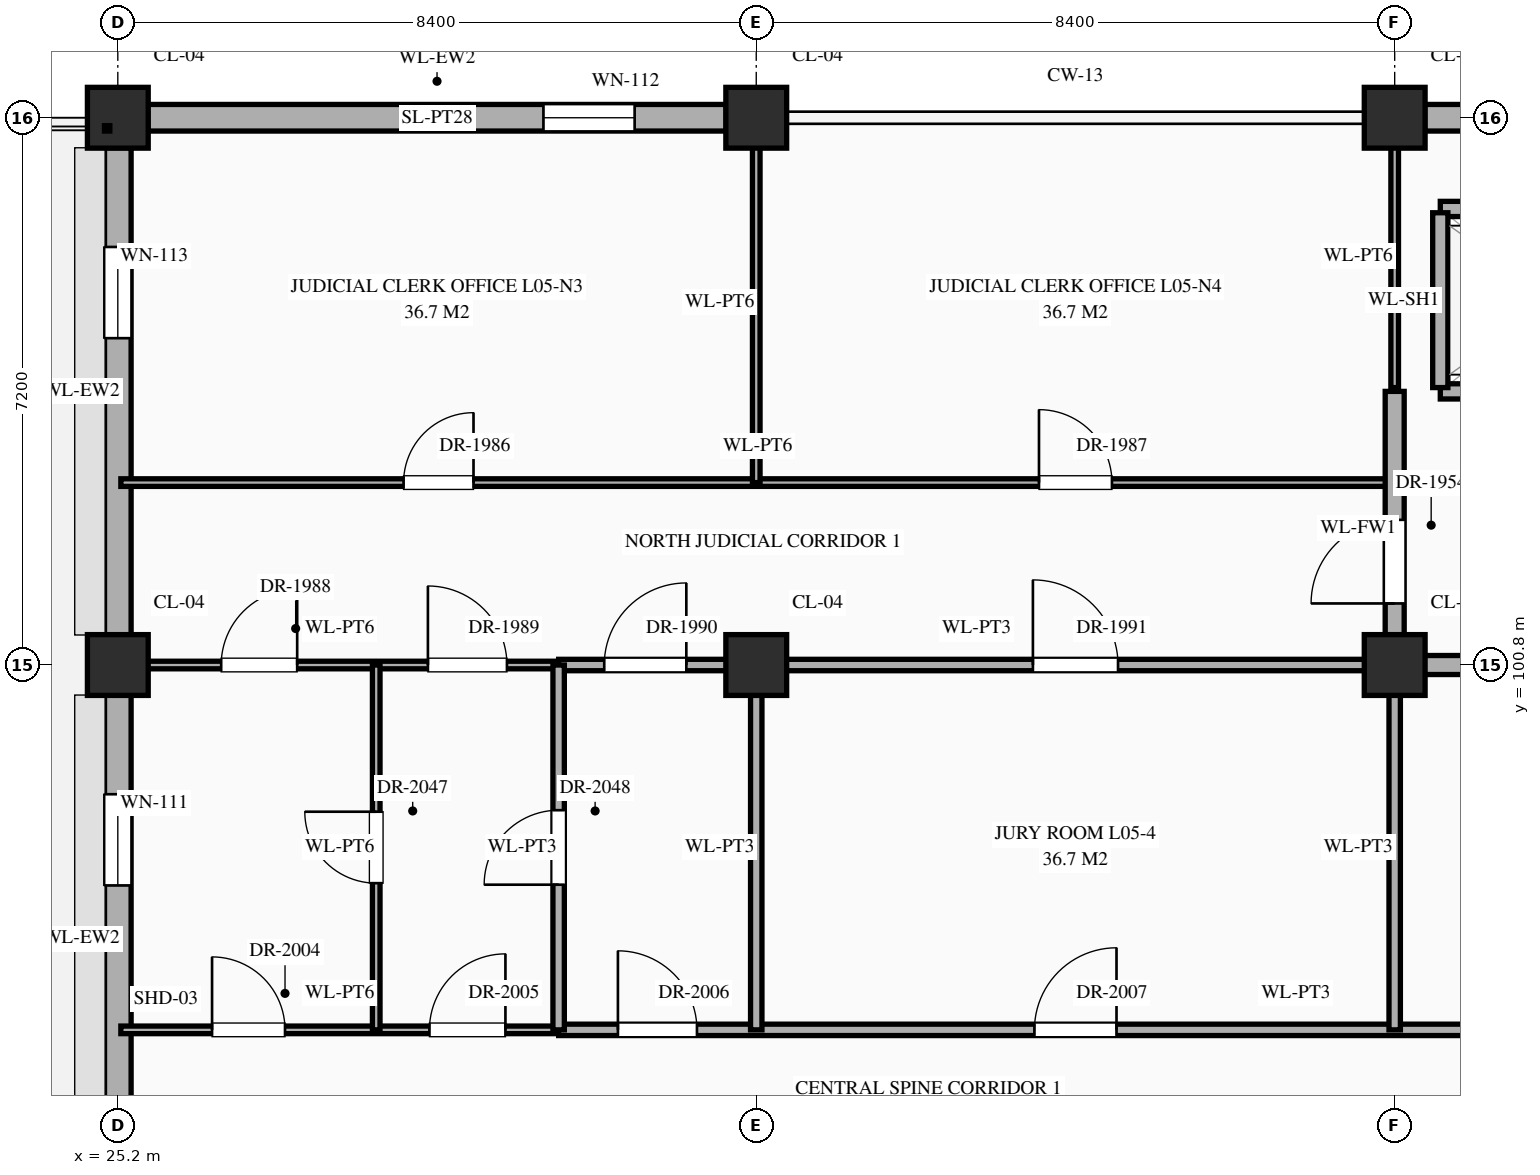
"""IFC4 building model, lengths in metres.
Left out: names, types, materials, properties, quantities, classifications, styles, units other than length and angle.
Written with IfcOpenShell. Run it as: python <this file> out.ifc"""

import sys

from ifc_helpers import new_model, si_unit, direction, frame, frame_2d, origin, origin_2d, place, context, subcontext, project, spatial, rectangle, extrude, element, fill, save


model = new_model("IFC4")
c1 = context("Model", 3, precision=1e-05, world=origin(), true_north=direction((0.0, 1.0)))
c2 = subcontext(c1, "Body", "Model", "MODEL_VIEW")
j1 = project(units=[si_unit("LENGTHUNIT", "METRE"), si_unit("PLANEANGLEUNIT", "RADIAN")], contexts=[c1])
p1 = place(None, origin())
s1 = spatial("IfcSite", under=j1, at=p1, CompositionType="ELEMENT")
p2 = place(p1, origin())
s2 = spatial("IfcBuilding", under=s1, at=p2, CompositionType="ELEMENT")
p3 = place(p2, frame((0.0, 0.0, 21.6)))
s3 = spatial("IfcBuildingStorey", under=s2, at=p3, CompositionType="ELEMENT", Elevation=21.6)
for number, where, z_axis, x_axis in (
    (1, (25.2, 100.8, 0.0), (0.0, 0.0, 1.0), (1.0, 0.0, 0.0)),
    (2, (25.2, 108.0, 0.0), (0.0, 0.0, 1.0), (1.0, 0.0, 0.0)),
    (3, (33.6, 100.8, 0.0), (0.0, 0.0, 1.0), (1.0, 0.0, 0.0)),
    (4, (33.6, 108.0, 0.0), (0.0, 0.0, 1.0), (1.0, 0.0, 0.0)),
    (5, (42.0, 100.8, 0.0), (0.0, 0.0, 1.0), (1.0, 0.0, 0.0)),
    (6, (42.0, 108.0, 0.0), (0.0, 0.0, 1.0), (1.0, 0.0, 0.0)),
):
    element("IfcColumn", number, at=place(p3, frame(where, z_axis=z_axis, x_axis=x_axis)), inside=s3, PredefinedType="COLUMN", context=c2, shape_type="SweptSolid", body=[
        extrude(rectangle(XDim=0.8, YDim=0.8, at=origin_2d()), origin(), (0.0, 0.0, 1.0), 4.5),
    ])
p4 = place(p3, frame((25.2, 93.995, 0.0), z_axis=(0.0, 0.0, 1.0), x_axis=(0.0, 1.0, 0.0)))
e7 = element("IfcWall", 7, at=p4, inside=s3, PredefinedType="STANDARD", context=c2, shape_type="SweptSolid", body=[
    extrude(rectangle(XDim=6.41, YDim=0.35, at=frame_2d((3.205, 0.0))), origin(), (0.0, 0.0, 1.0), 3.59),
])
p5 = place(p4, frame((3.905, 0.0, 0.85)))
e8 = element("IfcOpeningElement", 8, at=p5, cuts=e7, PredefinedType="OPENING", context=c2, shape_type="SweptSolid", body=[
    extrude(rectangle(XDim=1.2, YDim=1.74, at=frame_2d((0.6, 0.87))), frame((0.0, 0.187, 0.0), z_axis=(0.0, -1.0, 0.0), x_axis=(1.0, 0.0, 0.0)), (0.0, 0.0, 1.0), 0.374),
])
p6 = place(p3, frame((25.595, 108.0, 0.0), z_axis=(0.0, 0.0, 1.0), x_axis=(1.0, 0.0, 0.0)))
e9 = element("IfcWall", 9, at=p6, inside=s3, PredefinedType="STANDARD", context=c2, shape_type="SweptSolid", body=[
    extrude(rectangle(XDim=7.61, YDim=0.35, at=frame_2d((3.805, 0.0))), origin(), (0.0, 0.0, 1.0), 3.59),
])
p7 = place(p6, frame((5.205, 0.0, 0.85)))
e10 = element("IfcOpeningElement", 10, at=p7, cuts=e9, PredefinedType="OPENING", context=c2, shape_type="SweptSolid", body=[
    extrude(rectangle(XDim=1.2, YDim=1.92, at=frame_2d((0.6, 0.96))), frame((0.0, 0.187, 0.0), z_axis=(0.0, -1.0, 0.0), x_axis=(1.0, 0.0, 0.0)), (0.0, 0.0, 1.0), 0.374),
])
p8 = place(p3, frame((25.2, 101.195, 0.0), z_axis=(0.0, 0.0, 1.0), x_axis=(0.0, 1.0, 0.0)))
e11 = element("IfcWall", 11, at=p8, inside=s3, PredefinedType="STANDARD", context=c2, shape_type="SweptSolid", body=[
    extrude(rectangle(XDim=6.41, YDim=0.35, at=frame_2d((3.205, 0.0))), origin(), (0.0, 0.0, 1.0), 3.59),
])
p9 = place(p8, frame((3.905, 0.0, 0.85)))
e12 = element("IfcOpeningElement", 12, at=p9, cuts=e11, PredefinedType="OPENING", context=c2, shape_type="SweptSolid", body=[
    extrude(rectangle(XDim=1.2, YDim=1.92, at=frame_2d((0.6, 0.96))), frame((0.0, 0.187, 0.0), z_axis=(0.0, -1.0, 0.0), x_axis=(1.0, 0.0, 0.0)), (0.0, 0.0, 1.0), 0.374),
])
p10 = place(p3, frame((42.395, 108.0, 0.0), z_axis=(0.0, 0.0, 1.0), x_axis=(1.0, 0.0, 0.0)))
e13 = element("IfcWall", 13, at=p10, inside=s3, PredefinedType="STANDARD", context=c2, shape_type="SweptSolid", body=[
    extrude(rectangle(XDim=7.61, YDim=0.35, at=frame_2d((3.805, 0.0))), origin(), (0.0, 0.0, 1.0), 3.59),
])
p11 = place(p3, frame((25.24, 96.0, 0.0), z_axis=(0.0, 0.0, 1.0), x_axis=(1.0, 0.0, 0.0)))
e14 = element("IfcWall", 14, at=p11, inside=s3, PredefinedType="STANDARD", context=c2, shape_type="SweptSolid", body=[
    extrude(rectangle(XDim=5.76, YDim=0.1, at=frame_2d((2.88, 0.0))), origin(), (0.0, 0.0, 1.0), 4.24),
])
p12 = place(p11, frame((1.2, 0.0, 0.0)))
e15 = element("IfcOpeningElement", 15, at=p12, cuts=e14, PredefinedType="OPENING", context=c2, shape_type="SweptSolid", body=[
    extrude(rectangle(XDim=0.96, YDim=2.2, at=frame_2d((0.48, 1.1))), frame((0.0, 0.062, 0.0), z_axis=(0.0, -1.0, 0.0), x_axis=(1.0, 0.0, 0.0)), (0.0, 0.0, 1.0), 0.124),
])
p13 = place(p11, frame((4.06, 0.0, 0.0)))
e16 = element("IfcOpeningElement", 16, at=p13, cuts=e14, PredefinedType="OPENING", context=c2, shape_type="SweptSolid", body=[
    extrude(rectangle(XDim=1.0, YDim=2.25, at=frame_2d((0.5, 1.125))), frame((0.0, 0.062, 0.0), z_axis=(0.0, -1.0, 0.0), x_axis=(1.0, 0.0, 0.0)), (0.0, 0.0, 1.0), 0.124),
])
p14 = place(p3, frame((31.0, 96.0, 0.0), z_axis=(0.0, 0.0, 1.0), x_axis=(1.0, 0.0, 0.0)))
e17 = element("IfcWall", 17, at=p14, inside=s3, PredefinedType="STANDARD", context=c2, shape_type="SweptSolid", body=[
    extrude(rectangle(XDim=19.4, YDim=0.15, at=frame_2d((9.7, 0.0))), origin(), (0.0, 0.0, 1.0), 4.24),
])
p15 = place(p14, frame((0.78, 0.0, 0.0)))
e18 = element("IfcOpeningElement", 18, at=p15, cuts=e17, PredefinedType="OPENING", context=c2, shape_type="SweptSolid", body=[
    extrude(rectangle(XDim=1.04, YDim=2.2, at=frame_2d((0.52, 1.1))), frame((0.0, 0.087, 0.0), z_axis=(0.0, -1.0, 0.0), x_axis=(1.0, 0.0, 0.0)), (0.0, 0.0, 1.0), 0.174),
])
p16 = place(p14, frame((6.26, 0.0, 0.0)))
e19 = element("IfcOpeningElement", 19, at=p16, cuts=e17, PredefinedType="OPENING", context=c2, shape_type="SweptSolid", body=[
    extrude(rectangle(XDim=1.08, YDim=2.25, at=frame_2d((0.54, 1.125))), frame((0.0, 0.087, 0.0), z_axis=(0.0, -1.0, 0.0), x_axis=(1.0, 0.0, 0.0)), (0.0, 0.0, 1.0), 0.174),
])
p17 = place(p14, frame((14.64, 0.0, 0.0)))
e20 = element("IfcOpeningElement", 20, at=p17, cuts=e17, PredefinedType="OPENING", context=c2, shape_type="SweptSolid", body=[
    extrude(rectangle(XDim=1.12, YDim=2.25, at=frame_2d((0.56, 1.125))), frame((0.0, 0.087, 0.0), z_axis=(0.0, -1.0, 0.0), x_axis=(1.0, 0.0, 0.0)), (0.0, 0.0, 1.0), 0.174),
])
p18 = place(p3, frame((25.24, 100.8, 0.0), z_axis=(0.0, 0.0, 1.0), x_axis=(1.0, 0.0, 0.0)))
e21 = element("IfcWall", 21, at=p18, inside=s3, PredefinedType="STANDARD", context=c2, shape_type="SweptSolid", body=[
    extrude(rectangle(XDim=5.76, YDim=0.1, at=frame_2d((2.88, 0.0))), origin(), (0.0, 0.0, 1.0), 3.39),
])
p19 = place(p18, frame((1.32, 0.0, 0.0)))
e22 = element("IfcOpeningElement", 22, at=p19, cuts=e21, PredefinedType="OPENING", context=c2, shape_type="SweptSolid", body=[
    extrude(rectangle(XDim=1.0, YDim=2.25, at=frame_2d((0.5, 1.125))), frame((0.0, 0.062, 0.0), z_axis=(0.0, -1.0, 0.0), x_axis=(1.0, 0.0, 0.0)), (0.0, 0.0, 1.0), 0.124),
])
p20 = place(p18, frame((4.04, 0.0, 0.0)))
e23 = element("IfcOpeningElement", 23, at=p20, cuts=e21, PredefinedType="OPENING", context=c2, shape_type="SweptSolid", body=[
    extrude(rectangle(XDim=1.04, YDim=2.2, at=frame_2d((0.52, 1.1))), frame((0.0, 0.062, 0.0), z_axis=(0.0, -1.0, 0.0), x_axis=(1.0, 0.0, 0.0)), (0.0, 0.0, 1.0), 0.124),
])
p21 = place(p3, frame((31.0, 100.8, 0.0), z_axis=(0.0, 0.0, 1.0), x_axis=(1.0, 0.0, 0.0)))
e24 = element("IfcWall", 24, at=p21, inside=s3, PredefinedType="STANDARD", context=c2, shape_type="SweptSolid", body=[
    extrude(rectangle(XDim=11.0, YDim=0.15, at=frame_2d((5.5, 0.0))), origin(), (0.0, 0.0, 1.0), 3.39),
])
p22 = place(p21, frame((0.6, 0.0, 0.0)))
e25 = element("IfcOpeningElement", 25, at=p22, cuts=e24, PredefinedType="OPENING", context=c2, shape_type="SweptSolid", body=[
    extrude(rectangle(XDim=1.08, YDim=2.25, at=frame_2d((0.54, 1.125))), frame((0.0, 0.087, 0.0), z_axis=(0.0, -1.0, 0.0), x_axis=(1.0, 0.0, 0.0)), (0.0, 0.0, 1.0), 0.174),
])
p23 = place(p21, frame((6.24, 0.0, 0.0)))
e26 = element("IfcOpeningElement", 26, at=p23, cuts=e24, PredefinedType="OPENING", context=c2, shape_type="SweptSolid", body=[
    extrude(rectangle(XDim=1.12, YDim=2.25, at=frame_2d((0.56, 1.125))), frame((0.0, 0.087, 0.0), z_axis=(0.0, -1.0, 0.0), x_axis=(1.0, 0.0, 0.0)), (0.0, 0.0, 1.0), 0.174),
])
p24 = place(p3, frame((42.0, 100.8, 0.0), z_axis=(0.0, 0.0, 1.0), x_axis=(1.0, 0.0, 0.0)))
e27 = element("IfcWall", 27, at=p24, inside=s3, PredefinedType="STANDARD", context=c2, shape_type="SweptSolid", body=[
    extrude(rectangle(XDim=4.2, YDim=0.25, at=frame_2d((2.1, 0.0))), origin(), (0.0, 0.0, 1.0), 3.39),
])
p25 = place(p3, frame((25.24, 103.2, 0.0), z_axis=(0.0, 0.0, 1.0), x_axis=(1.0, 0.0, 0.0)))
e28 = element("IfcWall", 28, at=p25, inside=s3, PredefinedType="STANDARD", context=c2, shape_type="SweptSolid", body=[
    extrude(rectangle(XDim=16.76, YDim=0.1, at=frame_2d((8.38, 0.0))), origin(), (0.0, 0.0, 1.0), 4.24),
])
p26 = place(p25, frame((3.72, 0.0, 0.0)))
e29 = element("IfcOpeningElement", 29, at=p26, cuts=e28, PredefinedType="OPENING", context=c2, shape_type="SweptSolid", body=[
    extrude(rectangle(XDim=0.92, YDim=2.15, at=frame_2d((0.46, 1.075))), frame((0.0, 0.062, 0.0), z_axis=(0.0, -1.0, 0.0), x_axis=(1.0, 0.0, 0.0)), (0.0, 0.0, 1.0), 0.124),
])
p27 = place(p25, frame((12.08, 0.0, 0.0)))
e30 = element("IfcOpeningElement", 30, at=p27, cuts=e28, PredefinedType="OPENING", context=c2, shape_type="SweptSolid", body=[
    extrude(rectangle(XDim=0.96, YDim=2.2, at=frame_2d((0.48, 1.1))), frame((0.0, 0.062, 0.0), z_axis=(0.0, -1.0, 0.0), x_axis=(1.0, 0.0, 0.0)), (0.0, 0.0, 1.0), 0.124),
])
p28 = place(p3, frame((42.6, 104.4, 0.0), z_axis=(0.0, 0.0, 1.0), x_axis=(1.0, 0.0, 0.0)))
e31 = element("IfcWall", 31, at=p28, inside=s3, PredefinedType="STANDARD", context=c2, shape_type="SweptSolid", body=[
    extrude(rectangle(XDim=3.0, YDim=0.2, at=frame_2d((1.5, 0.0))), origin(), (0.0, 0.0, 1.0), 4.24),
])
p29 = place(p28, frame((0.9, 0.0, 0.0)))
e32 = element("IfcOpeningElement", 32, at=p29, cuts=e31, PredefinedType="OPENING", context=c2, shape_type="SweptSolid", body=[
    extrude(rectangle(XDim=1.2, YDim=2.15, at=frame_2d((0.6, 1.075))), frame((0.0, 0.112, 0.0), z_axis=(0.0, -1.0, 0.0), x_axis=(1.0, 0.0, 0.0)), (0.0, 0.0, 1.0), 0.224),
])
p30 = place(p3, frame((42.6, 106.8, 0.0), z_axis=(0.0, 0.0, 1.0), x_axis=(1.0, 0.0, 0.0)))
e33 = element("IfcWall", 33, at=p30, inside=s3, PredefinedType="STANDARD", context=c2, shape_type="SweptSolid", body=[
    extrude(rectangle(XDim=3.0, YDim=0.2, at=frame_2d((1.5, 0.0))), origin(), (0.0, 0.0, 1.0), 4.24),
])
p31 = place(p3, frame((28.6, 96.0, 0.0), z_axis=(0.0, 0.0, 1.0), x_axis=(0.0, 1.0, 0.0)))
e34 = element("IfcWall", 34, at=p31, inside=s3, PredefinedType="STANDARD", context=c2, shape_type="SweptSolid", body=[
    extrude(rectangle(XDim=4.8, YDim=0.1, at=frame_2d((2.4, 0.0))), origin(), (0.0, 0.0, 1.0), 4.24),
])
p32 = place(p31, frame((1.93, 0.0, 0.0)))
e35 = element("IfcOpeningElement", 35, at=p32, cuts=e34, PredefinedType="OPENING", context=c2, shape_type="SweptSolid", body=[
    extrude(rectangle(XDim=0.94, YDim=2.3, at=frame_2d((0.47, 1.15))), frame((0.0, 0.062, 0.0), z_axis=(0.0, -1.0, 0.0), x_axis=(1.0, 0.0, 0.0)), (0.0, 0.0, 1.0), 0.124),
])
p33 = place(p3, frame((31.0, 96.0, 0.0), z_axis=(0.0, 0.0, 1.0), x_axis=(0.0, 1.0, 0.0)))
e36 = element("IfcWall", 36, at=p33, inside=s3, PredefinedType="STANDARD", context=c2, shape_type="SweptSolid", body=[
    extrude(rectangle(XDim=4.8, YDim=0.15, at=frame_2d((2.4, 0.0))), origin(), (0.0, 0.0, 1.0), 4.24),
])
p34 = place(p33, frame((1.91, 0.0, 0.0)))
e37 = element("IfcOpeningElement", 37, at=p34, cuts=e36, PredefinedType="OPENING", context=c2, shape_type="SweptSolid", body=[
    extrude(rectangle(XDim=0.98, YDim=2.35, at=frame_2d((0.49, 1.175))), frame((0.0, 0.087, 0.0), z_axis=(0.0, -1.0, 0.0), x_axis=(1.0, 0.0, 0.0)), (0.0, 0.0, 1.0), 0.174),
])
p35 = place(p3, frame((33.6, 96.0, 0.0), z_axis=(0.0, 0.0, 1.0), x_axis=(0.0, 1.0, 0.0)))
e38 = element("IfcWall", 38, at=p35, inside=s3, PredefinedType="STANDARD", context=c2, shape_type="SweptSolid", body=[
    extrude(rectangle(XDim=4.8, YDim=0.15, at=frame_2d((2.4, 0.0))), origin(), (0.0, 0.0, 1.0), 4.24),
])
p36 = place(p3, frame((33.6, 103.2, 0.0), z_axis=(0.0, 0.0, 1.0), x_axis=(0.0, 1.0, 0.0)))
e39 = element("IfcWall", 39, at=p36, inside=s3, PredefinedType="STANDARD", context=c2, shape_type="SweptSolid", body=[
    extrude(rectangle(XDim=4.76, YDim=0.1, at=frame_2d((2.38, 0.0))), origin(), (0.0, 0.0, 1.0), 3.49),
])
p37 = place(p3, frame((42.0, 96.0, 0.0), z_axis=(0.0, 0.0, 1.0), x_axis=(0.0, 1.0, 0.0)))
e40 = element("IfcWall", 40, at=p37, inside=s3, PredefinedType="STANDARD", context=c2, shape_type="SweptSolid", body=[
    extrude(rectangle(XDim=4.8, YDim=0.15, at=frame_2d((2.4, 0.0))), origin(), (0.0, 0.0, 1.0), 3.49),
])
p38 = place(p3, frame((42.0, 100.8, 0.0), z_axis=(0.0, 0.0, 1.0), x_axis=(0.0, 1.0, 0.0)))
e41 = element("IfcWall", 41, at=p38, inside=s3, PredefinedType="STANDARD", context=c2, shape_type="SweptSolid", body=[
    extrude(rectangle(XDim=3.6, YDim=0.25, at=frame_2d((1.8, 0.0))), origin(), (0.0, 0.0, 1.0), 3.49),
])
p39 = place(p38, frame((0.81, 0.0, 0.0)))
e42 = element("IfcOpeningElement", 42, at=p39, cuts=e41, PredefinedType="OPENING", context=c2, shape_type="SweptSolid", body=[
    extrude(rectangle(XDim=1.1, YDim=2.2, at=frame_2d((0.55, 1.1))), frame((0.0, 0.137, 0.0), z_axis=(0.0, -1.0, 0.0), x_axis=(1.0, 0.0, 0.0)), (0.0, 0.0, 1.0), 0.274),
])
p40 = place(p3, frame((42.0, 104.45, 0.0), z_axis=(0.0, 0.0, 1.0), x_axis=(0.0, 1.0, 0.0)))
e43 = element("IfcWall", 43, at=p40, inside=s3, PredefinedType="STANDARD", context=c2, shape_type="SweptSolid", body=[
    extrude(rectangle(XDim=3.46, YDim=0.1, at=frame_2d((1.73, 0.0))), origin(), (0.0, 0.0, 1.0), 3.49),
])
p41 = place(p3, frame((42.6, 104.45, 0.0), z_axis=(0.0, 0.0, 1.0), x_axis=(0.0, 1.0, 0.0)))
e44 = element("IfcWall", 44, at=p41, inside=s3, PredefinedType="STANDARD", context=c2, shape_type="SweptSolid", body=[
    extrude(rectangle(XDim=2.3, YDim=0.2, at=frame_2d((1.15, 0.0))), origin(), (0.0, 0.0, 1.0), 4.24),
])
p42 = place(p5, origin())
e45 = element("IfcWindow", 45, at=p42, inside=s3, PartitioningType="SINGLE_PANEL", PredefinedType="WINDOW", context=c2, shape_type="SweptSolid", body=[
    extrude(rectangle(XDim=1.2, YDim=1.74, at=frame_2d((0.6, 0.87))), frame((0.0, 0.03, 0.0), z_axis=(0.0, -1.0, 0.0), x_axis=(1.0, 0.0, 0.0)), (0.0, 0.0, 1.0), 0.06),
])
fill(e8, e45)
p43 = place(p7, origin())
e46 = element("IfcWindow", 46, at=p43, inside=s3, PartitioningType="SINGLE_PANEL", PredefinedType="WINDOW", context=c2, shape_type="SweptSolid", body=[
    extrude(rectangle(XDim=1.2, YDim=1.92, at=frame_2d((0.6, 0.96))), frame((0.0, 0.03, 0.0), z_axis=(0.0, -1.0, 0.0), x_axis=(1.0, 0.0, 0.0)), (0.0, 0.0, 1.0), 0.06),
])
fill(e10, e46)
p44 = place(p9, origin())
e47 = element("IfcWindow", 47, at=p44, inside=s3, PartitioningType="SINGLE_PANEL", PredefinedType="WINDOW", context=c2, shape_type="SweptSolid", body=[
    extrude(rectangle(XDim=1.2, YDim=1.92, at=frame_2d((0.6, 0.96))), frame((0.0, 0.03, 0.0), z_axis=(0.0, -1.0, 0.0), x_axis=(1.0, 0.0, 0.0)), (0.0, 0.0, 1.0), 0.06),
])
fill(e12, e47)
p45 = place(p39, origin())
e48 = element("IfcDoor", 48, at=p45, inside=s3, OperationType="SINGLE_SWING_LEFT", PredefinedType="DOOR", context=c2, shape_type="SweptSolid", body=[
    extrude(rectangle(XDim=1.1, YDim=2.2, at=frame_2d((0.55, 1.1))), frame((0.0, 0.025, 0.0), z_axis=(0.0, -1.0, 0.0), x_axis=(1.0, 0.0, 0.0)), (0.0, 0.0, 1.0), 0.05),
])
fill(e42, e48)
p46 = place(p26, origin())
e49 = element("IfcDoor", 49, at=p46, inside=s3, OperationType="SINGLE_SWING_RIGHT", PredefinedType="DOOR", context=c2, shape_type="SweptSolid", body=[
    extrude(rectangle(XDim=0.92, YDim=2.15, at=frame_2d((0.46, 1.075))), frame((0.0, 0.025, 0.0), z_axis=(0.0, -1.0, 0.0), x_axis=(1.0, 0.0, 0.0)), (0.0, 0.0, 1.0), 0.05),
])
fill(e29, e49)
p47 = place(p27, origin())
e50 = element("IfcDoor", 50, at=p47, inside=s3, OperationType="SINGLE_SWING_LEFT", PredefinedType="DOOR", context=c2, shape_type="SweptSolid", body=[
    extrude(rectangle(XDim=0.96, YDim=2.2, at=frame_2d((0.48, 1.1))), frame((0.0, 0.025, 0.0), z_axis=(0.0, -1.0, 0.0), x_axis=(1.0, 0.0, 0.0)), (0.0, 0.0, 1.0), 0.05),
])
fill(e30, e50)
p48 = place(p19, origin())
e51 = element("IfcDoor", 51, at=p48, inside=s3, OperationType="SINGLE_SWING_RIGHT", PredefinedType="DOOR", context=c2, shape_type="SweptSolid", body=[
    extrude(rectangle(XDim=1.0, YDim=2.25, at=frame_2d((0.5, 1.125))), frame((0.0, 0.025, 0.0), z_axis=(0.0, -1.0, 0.0), x_axis=(1.0, 0.0, 0.0)), (0.0, 0.0, 1.0), 0.05),
])
fill(e22, e51)
p49 = place(p20, origin())
e52 = element("IfcDoor", 52, at=p49, inside=s3, OperationType="SINGLE_SWING_LEFT", PredefinedType="DOOR", context=c2, shape_type="SweptSolid", body=[
    extrude(rectangle(XDim=1.04, YDim=2.2, at=frame_2d((0.52, 1.1))), frame((0.0, 0.025, 0.0), z_axis=(0.0, -1.0, 0.0), x_axis=(1.0, 0.0, 0.0)), (0.0, 0.0, 1.0), 0.05),
])
fill(e23, e52)
p50 = place(p22, origin())
e53 = element("IfcDoor", 53, at=p50, inside=s3, OperationType="SINGLE_SWING_RIGHT", PredefinedType="DOOR", context=c2, shape_type="SweptSolid", body=[
    extrude(rectangle(XDim=1.08, YDim=2.25, at=frame_2d((0.54, 1.125))), frame((0.0, 0.025, 0.0), z_axis=(0.0, -1.0, 0.0), x_axis=(1.0, 0.0, 0.0)), (0.0, 0.0, 1.0), 0.05),
])
fill(e25, e53)
p51 = place(p23, origin())
e54 = element("IfcDoor", 54, at=p51, inside=s3, OperationType="SINGLE_SWING_LEFT", PredefinedType="DOOR", context=c2, shape_type="SweptSolid", body=[
    extrude(rectangle(XDim=1.12, YDim=2.25, at=frame_2d((0.56, 1.125))), frame((0.0, 0.025, 0.0), z_axis=(0.0, -1.0, 0.0), x_axis=(1.0, 0.0, 0.0)), (0.0, 0.0, 1.0), 0.05),
])
fill(e26, e54)
p52 = place(p12, origin())
e55 = element("IfcDoor", 55, at=p52, inside=s3, OperationType="SINGLE_SWING_LEFT", PredefinedType="DOOR", context=c2, shape_type="SweptSolid", body=[
    extrude(rectangle(XDim=0.96, YDim=2.2, at=frame_2d((0.48, 1.1))), frame((0.0, 0.025, 0.0), z_axis=(0.0, -1.0, 0.0), x_axis=(1.0, 0.0, 0.0)), (0.0, 0.0, 1.0), 0.05),
])
fill(e15, e55)
p53 = place(p13, origin())
e56 = element("IfcDoor", 56, at=p53, inside=s3, OperationType="SINGLE_SWING_RIGHT", PredefinedType="DOOR", context=c2, shape_type="SweptSolid", body=[
    extrude(rectangle(XDim=1.0, YDim=2.25, at=frame_2d((0.5, 1.125))), frame((0.0, 0.025, 0.0), z_axis=(0.0, -1.0, 0.0), x_axis=(1.0, 0.0, 0.0)), (0.0, 0.0, 1.0), 0.05),
])
fill(e16, e56)
p54 = place(p15, origin())
e57 = element("IfcDoor", 57, at=p54, inside=s3, OperationType="SINGLE_SWING_LEFT", PredefinedType="DOOR", context=c2, shape_type="SweptSolid", body=[
    extrude(rectangle(XDim=1.04, YDim=2.2, at=frame_2d((0.52, 1.1))), frame((0.0, 0.025, 0.0), z_axis=(0.0, -1.0, 0.0), x_axis=(1.0, 0.0, 0.0)), (0.0, 0.0, 1.0), 0.05),
])
fill(e18, e57)
p55 = place(p16, origin())
e58 = element("IfcDoor", 58, at=p55, inside=s3, OperationType="SINGLE_SWING_RIGHT", PredefinedType="DOOR", context=c2, shape_type="SweptSolid", body=[
    extrude(rectangle(XDim=1.08, YDim=2.25, at=frame_2d((0.54, 1.125))), frame((0.0, 0.025, 0.0), z_axis=(0.0, -1.0, 0.0), x_axis=(1.0, 0.0, 0.0)), (0.0, 0.0, 1.0), 0.05),
])
fill(e19, e58)
p56 = place(p32, origin())
e59 = element("IfcDoor", 59, at=p56, inside=s3, OperationType="SINGLE_SWING_RIGHT", PredefinedType="DOOR", context=c2, shape_type="SweptSolid", body=[
    extrude(rectangle(XDim=0.94, YDim=2.3, at=frame_2d((0.47, 1.15))), frame((0.0, 0.025, 0.0), z_axis=(0.0, -1.0, 0.0), x_axis=(1.0, 0.0, 0.0)), (0.0, 0.0, 1.0), 0.05),
])
fill(e35, e59)
p57 = place(p34, origin())
e60 = element("IfcDoor", 60, at=p57, inside=s3, OperationType="SINGLE_SWING_LEFT", PredefinedType="DOOR", context=c2, shape_type="SweptSolid", body=[
    extrude(rectangle(XDim=0.98, YDim=2.35, at=frame_2d((0.49, 1.175))), frame((0.0, 0.025, 0.0), z_axis=(0.0, -1.0, 0.0), x_axis=(1.0, 0.0, 0.0)), (0.0, 0.0, 1.0), 0.05),
])
fill(e37, e60)
save(model, sys.argv[1])
